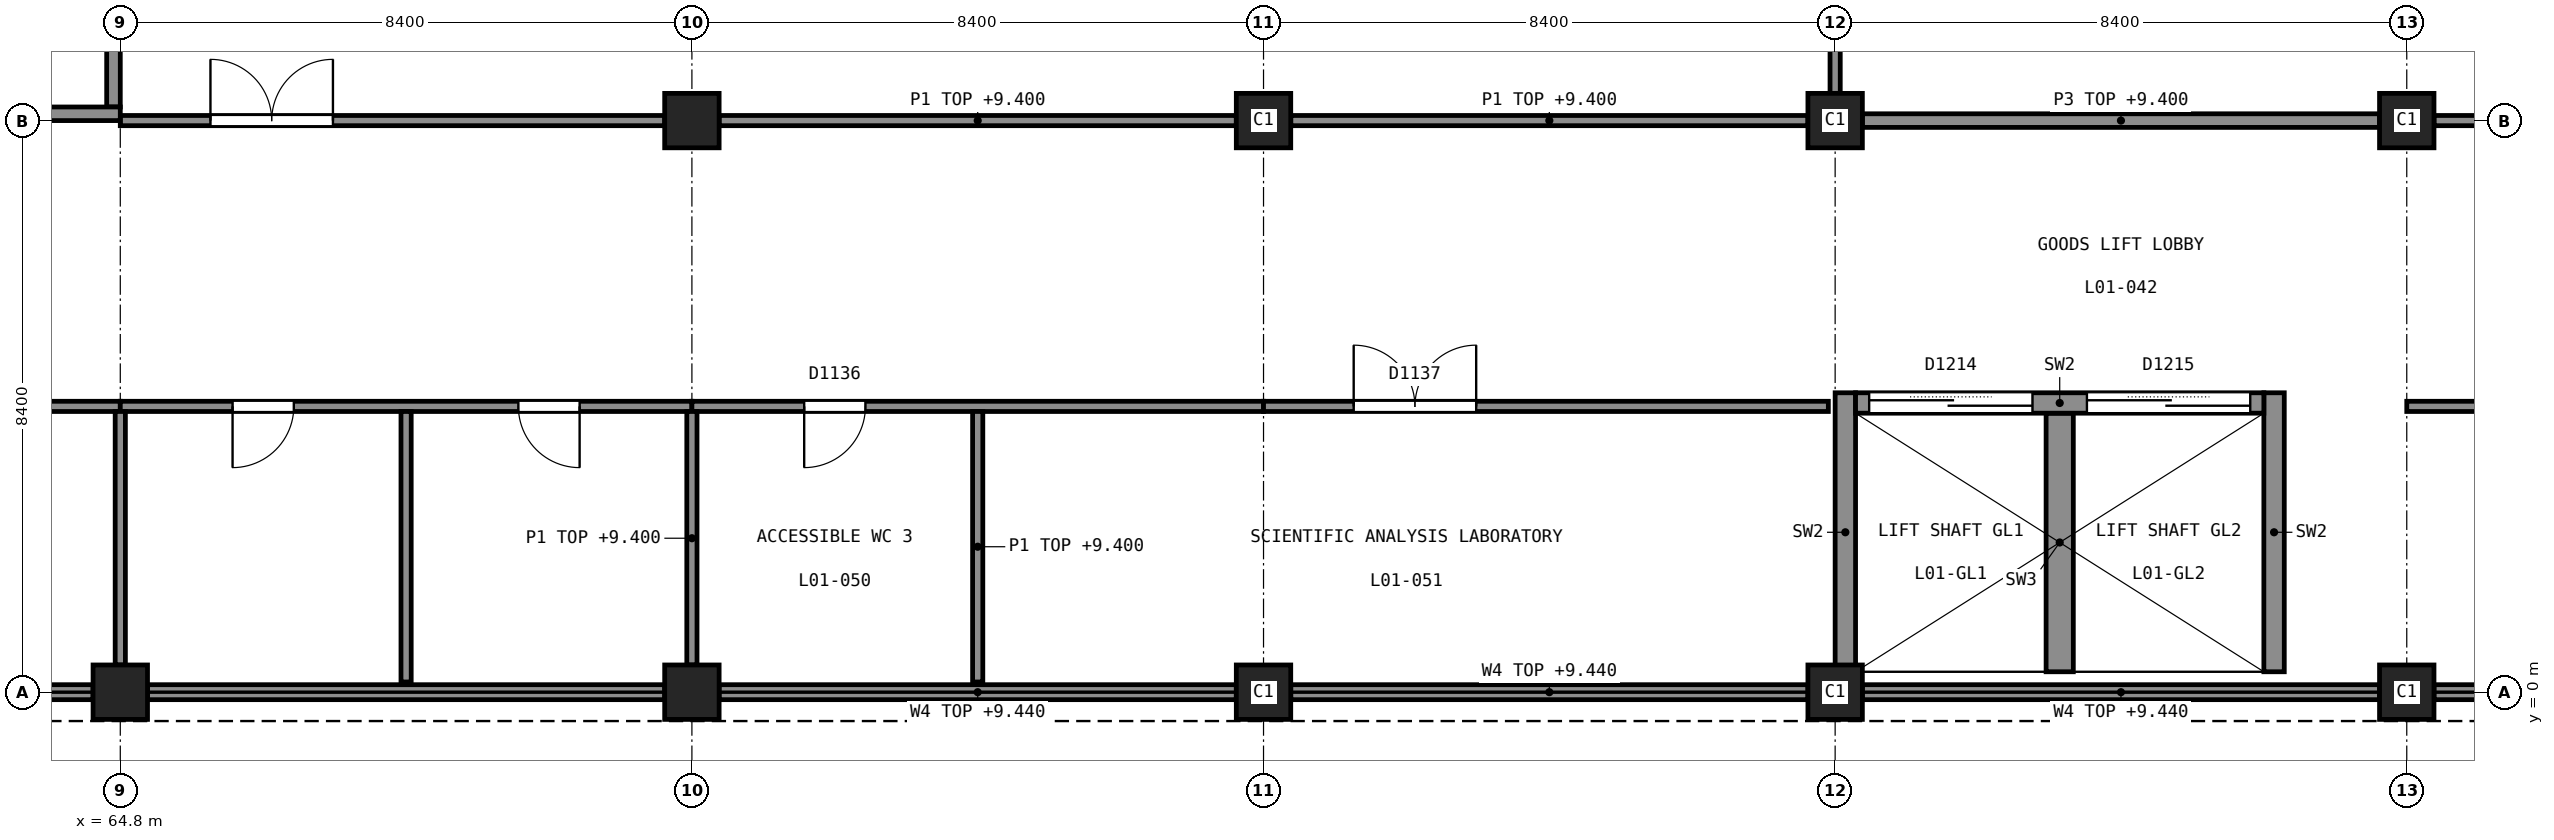
"""IFC4 building model, lengths in metres.
Left out: names, types, materials, properties, quantities, classifications, styles, units other than length and angle.
Written with IfcOpenShell. Run it as: python <this file> out.ifc"""

import sys

from ifc_helpers import new_model, si_unit, direction, frame, frame_2d, origin, origin_2d, place, context, subcontext, project, spatial, rectangle, extrude, element, fill, save


model = new_model("IFC4")
c1 = context("Model", 3, precision=1e-05, world=origin(), true_north=direction((0.0, 1.0)))
c2 = subcontext(c1, "Body", "Model", "MODEL_VIEW")
j1 = project(units=[si_unit("LENGTHUNIT", "METRE"), si_unit("PLANEANGLEUNIT", "RADIAN")], contexts=[c1])
p1 = place(None, origin())
s1 = spatial("IfcSite", under=j1, at=p1, CompositionType="ELEMENT")
p2 = place(p1, origin())
s2 = spatial("IfcBuilding", under=s1, at=p2, CompositionType="ELEMENT")
p3 = place(p2, frame((0.0, 0.0, 5.5)))
s3 = spatial("IfcBuildingStorey", under=s2, at=p3, CompositionType="ELEMENT", Elevation=5.5)
p4 = place(p3, frame((56.4, 8.5, 0.0), z_axis=(0.0, 0.0, 1.0), x_axis=(1.0, 0.0, 0.0)))
e1 = element("IfcWall", 1, at=p4, inside=s3, PredefinedType="SHEAR", context=c2, shape_type="SweptSolid", body=[
    extrude(rectangle(XDim=8.4, YDim=0.2, at=frame_2d((4.2, 0.0))), origin(), (0.0, 0.0, 1.0), 5.0),
])
p5 = place(p4, frame((3.3, 0.0, 0.0)))
e2 = element("IfcOpeningElement", 2, at=p5, cuts=e1, PredefinedType="OPENING", context=c2, shape_type="SweptSolid", body=[
    extrude(rectangle(XDim=1.8, YDim=2.1, at=frame_2d((0.9, 1.05))), frame((0.0, 0.11, 0.0), z_axis=(0.0, -1.0, 0.0), x_axis=(1.0, 0.0, 0.0)), (0.0, 0.0, 1.0), 0.22),
])
p6 = place(p3, frame((64.7, 8.6, 0.0), z_axis=(0.0, 0.0, 1.0), x_axis=(0.0, 1.0, 0.0)))
e3 = element("IfcWall", 3, at=p6, inside=s3, PredefinedType="SHEAR", context=c2, shape_type="SweptSolid", body=[
    extrude(rectangle(XDim=8.0, YDim=0.2, at=frame_2d((4.0, 0.0))), origin(), (0.0, 0.0, 1.0), 5.0),
])
for number, where, z_axis, x_axis in (
    (4, (90.15, 0.3, 0.0), (0.0, 0.0, 1.0), (0.0, 1.0, 0.0)),
    (5, (96.45, 0.3, 0.0), (0.0, 0.0, 1.0), (0.0, 1.0, 0.0)),
):
    element("IfcWall", number, at=place(p3, frame(where, z_axis=z_axis, x_axis=x_axis)), inside=s3, PredefinedType="SHEAR", context=c2, shape_type="SweptSolid", body=[
        extrude(rectangle(XDim=4.1, YDim=0.3, at=frame_2d((2.05, 0.0))), origin(), (0.0, 0.0, 1.0), 5.0),
    ])
p7 = place(p3, frame((90.3, 4.25, 0.0), z_axis=(0.0, 0.0, 1.0), x_axis=(1.0, 0.0, 0.0)))
e6 = element("IfcWall", 6, at=p7, inside=s3, PredefinedType="SHEAR", context=c2, shape_type="SweptSolid", body=[
    extrude(rectangle(XDim=6.0, YDim=0.3, at=frame_2d((3.0, 0.0))), origin(), (0.0, 0.0, 1.0), 5.0),
])
p8 = place(p7, frame((0.2, 0.0, 0.0)))
e7 = element("IfcOpeningElement", 7, at=p8, cuts=e6, PredefinedType="OPENING", context=c2, shape_type="SweptSolid", body=[
    extrude(rectangle(XDim=2.4, YDim=2.4, at=frame_2d((1.2, 1.2))), frame((0.0, 0.16, 0.0), z_axis=(0.0, -1.0, 0.0), x_axis=(1.0, 0.0, 0.0)), (0.0, 0.0, 1.0), 0.32),
])
p9 = place(p7, frame((3.4, 0.0, 0.0)))
e8 = element("IfcOpeningElement", 8, at=p9, cuts=e6, PredefinedType="OPENING", context=c2, shape_type="SweptSolid", body=[
    extrude(rectangle(XDim=2.4, YDim=2.4, at=frame_2d((1.2, 1.2))), frame((0.0, 0.16, 0.0), z_axis=(0.0, -1.0, 0.0), x_axis=(1.0, 0.0, 0.0)), (0.0, 0.0, 1.0), 0.32),
])
p10 = place(p3, frame((93.3, 0.3, 0.0), z_axis=(0.0, 0.0, 1.0), x_axis=(0.0, 1.0, 0.0)))
e9 = element("IfcWall", 9, at=p10, inside=s3, PredefinedType="SHEAR", context=c2, shape_type="SweptSolid", body=[
    extrude(rectangle(XDim=3.8, YDim=0.4, at=frame_2d((1.9, 0.0))), origin(), (0.0, 0.0, 1.0), 5.0),
])
for number, where, z_axis, x_axis in (
    (10, (64.8, 0.0, 0.0), (0.0, 0.0, 1.0), (1.0, 0.0, 0.0)),
    (11, (73.2, 0.0, 0.0), (0.0, 0.0, 1.0), (1.0, 0.0, 0.0)),
    (12, (73.2, 8.4, 0.0), (0.0, 0.0, 1.0), (1.0, 0.0, 0.0)),
    (13, (81.6, 0.0, 0.0), (0.0, 0.0, 1.0), (1.0, 0.0, 0.0)),
    (14, (81.6, 8.4, 0.0), (0.0, 0.0, 1.0), (1.0, 0.0, 0.0)),
    (15, (90.0, 0.0, 0.0), (0.0, 0.0, 1.0), (1.0, 0.0, 0.0)),
    (16, (90.0, 8.4, 0.0), (0.0, 0.0, 1.0), (1.0, 0.0, 0.0)),
    (17, (98.4, 0.0, 0.0), (0.0, 0.0, 1.0), (1.0, 0.0, 0.0)),
    (18, (98.4, 8.4, 0.0), (0.0, 0.0, 1.0), (1.0, 0.0, 0.0)),
):
    element("IfcColumn", number, at=place(p3, frame(where, z_axis=z_axis, x_axis=x_axis)), inside=s3, PredefinedType="COLUMN", context=c2, shape_type="SweptSolid", body=[
        extrude(rectangle(XDim=0.8, YDim=0.8, at=origin_2d()), origin(), (0.0, 0.0, 1.0), 5.0),
    ])
p11 = place(p3, frame((56.8, 0.0, 0.0), z_axis=(0.0, 0.0, 1.0), x_axis=(1.0, 0.0, 0.0)))
e19 = element("IfcWall", 19, at=p11, inside=s3, PredefinedType="SOLIDWALL", context=c2, shape_type="SweptSolid", body=[
    extrude(rectangle(XDim=7.6, YDim=0.22, at=frame_2d((3.8, 0.0))), origin(), (0.0, 0.0, 1.0), 3.94),
])
p12 = place(p3, frame((65.2, 0.0, 0.0), z_axis=(0.0, 0.0, 1.0), x_axis=(1.0, 0.0, 0.0)))
e20 = element("IfcWall", 20, at=p12, inside=s3, PredefinedType="SOLIDWALL", context=c2, shape_type="SweptSolid", body=[
    extrude(rectangle(XDim=7.6, YDim=0.22, at=frame_2d((3.8, 0.0))), origin(), (0.0, 0.0, 1.0), 3.94),
])
p13 = place(p3, frame((73.6, 0.0, 0.0), z_axis=(0.0, 0.0, 1.0), x_axis=(1.0, 0.0, 0.0)))
e21 = element("IfcWall", 21, at=p13, inside=s3, PredefinedType="SOLIDWALL", context=c2, shape_type="SweptSolid", body=[
    extrude(rectangle(XDim=7.6, YDim=0.22, at=frame_2d((3.8, 0.0))), origin(), (0.0, 0.0, 1.0), 3.94),
])
for number, where, z_axis, x_axis in (
    (22, (82.0, 0.0, 0.0), (0.0, 0.0, 1.0), (1.0, 0.0, 0.0)),
    (23, (90.4, 0.0, 0.0), (0.0, 0.0, 1.0), (1.0, 0.0, 0.0)),
):
    element("IfcWall", number, at=place(p3, frame(where, z_axis=z_axis, x_axis=x_axis)), inside=s3, PredefinedType="SOLIDWALL", context=c2, shape_type="SweptSolid", body=[
        extrude(rectangle(XDim=7.6, YDim=0.22, at=frame_2d((3.8, 0.0))), origin(), (0.0, 0.0, 1.0), 3.94),
    ])
p14 = place(p3, frame((98.8, 0.0, 0.0), z_axis=(0.0, 0.0, 1.0), x_axis=(1.0, 0.0, 0.0)))
e24 = element("IfcWall", 24, at=p14, inside=s3, PredefinedType="SOLIDWALL", context=c2, shape_type="SweptSolid", body=[
    extrude(rectangle(XDim=7.6, YDim=0.22, at=frame_2d((3.8, 0.0))), origin(), (0.0, 0.0, 1.0), 3.94),
])
p15 = place(p3, frame((90.0, 8.8, 0.0), z_axis=(0.0, 0.0, 1.0), x_axis=(0.0, 1.0, 0.0)))
e25 = element("IfcWall", 25, at=p15, inside=s3, PredefinedType="PARTITIONING", context=c2, shape_type="SweptSolid", body=[
    extrude(rectangle(XDim=7.6, YDim=0.15, at=frame_2d((3.8, 0.0))), origin(), (0.0, 0.0, 1.0), 3.9),
])
p16 = place(p3, frame((64.8, 8.4, 0.0), z_axis=(0.0, 0.0, 1.0), x_axis=(1.0, 0.0, 0.0)))
e26 = element("IfcWall", 26, at=p16, inside=s3, PredefinedType="PARTITIONING", context=c2, shape_type="SweptSolid", body=[
    extrude(rectangle(XDim=8.0, YDim=0.15, at=frame_2d((4.0, 0.0))), origin(), (0.0, 0.0, 1.0), 3.9),
])
p17 = place(p16, frame((1.325, 0.0, 0.0)))
e27 = element("IfcOpeningElement", 27, at=p17, cuts=e26, PredefinedType="OPENING", context=c2, shape_type="SweptSolid", body=[
    extrude(rectangle(XDim=1.8, YDim=2.1, at=frame_2d((0.9, 1.05))), frame((0.0, 0.085, 0.0), z_axis=(0.0, -1.0, 0.0), x_axis=(1.0, 0.0, 0.0)), (0.0, 0.0, 1.0), 0.17),
])
p18 = place(p3, frame((73.6, 8.4, 0.0), z_axis=(0.0, 0.0, 1.0), x_axis=(1.0, 0.0, 0.0)))
e28 = element("IfcWall", 28, at=p18, inside=s3, PredefinedType="PARTITIONING", context=c2, shape_type="SweptSolid", body=[
    extrude(rectangle(XDim=7.6, YDim=0.15, at=frame_2d((3.8, 0.0))), origin(), (0.0, 0.0, 1.0), 3.9),
])
p19 = place(p3, frame((82.0, 8.4, 0.0), z_axis=(0.0, 0.0, 1.0), x_axis=(1.0, 0.0, 0.0)))
e29 = element("IfcWall", 29, at=p19, inside=s3, PredefinedType="PARTITIONING", context=c2, shape_type="SweptSolid", body=[
    extrude(rectangle(XDim=7.6, YDim=0.15, at=frame_2d((3.8, 0.0))), origin(), (0.0, 0.0, 1.0), 3.9),
])
p20 = place(p3, frame((98.8, 8.4, 0.0), z_axis=(0.0, 0.0, 1.0), x_axis=(1.0, 0.0, 0.0)))
e30 = element("IfcWall", 30, at=p20, inside=s3, PredefinedType="PARTITIONING", context=c2, shape_type="SweptSolid", body=[
    extrude(rectangle(XDim=7.6, YDim=0.15, at=frame_2d((3.8, 0.0))), origin(), (0.0, 0.0, 1.0), 3.9),
])
p21 = place(p3, frame((90.4, 8.4, 0.0), z_axis=(0.0, 0.0, 1.0), x_axis=(1.0, 0.0, 0.0)))
e31 = element("IfcWall", 31, at=p21, inside=s3, PredefinedType="PARTITIONING", context=c2, shape_type="SweptSolid", body=[
    extrude(rectangle(XDim=7.6, YDim=0.2, at=frame_2d((3.8, 0.0))), origin(), (0.0, 0.0, 1.0), 3.9),
])
p22 = place(p3, frame((98.4, 4.2, 0.0), z_axis=(0.0, 0.0, 1.0), x_axis=(1.0, 0.0, 0.0)))
e32 = element("IfcWall", 32, at=p22, inside=s3, PredefinedType="PARTITIONING", context=c2, shape_type="SweptSolid", body=[
    extrude(rectangle(XDim=8.4, YDim=0.15, at=frame_2d((4.2, 0.0))), origin(), (0.0, 0.0, 1.0), 3.9),
])
p23 = place(p22, frame((5.275, 0.0, 0.0)))
e33 = element("IfcOpeningElement", 33, at=p23, cuts=e32, PredefinedType="OPENING", context=c2, shape_type="SweptSolid", body=[
    extrude(rectangle(XDim=1.8, YDim=2.1, at=frame_2d((0.9, 1.05))), frame((0.0, 0.085, 0.0), z_axis=(0.0, -1.0, 0.0), x_axis=(1.0, 0.0, 0.0)), (0.0, 0.0, 1.0), 0.17),
])
p24 = place(p3, frame((56.4, 4.2, 0.0), z_axis=(0.0, 0.0, 1.0), x_axis=(1.0, 0.0, 0.0)))
e34 = element("IfcWall", 34, at=p24, inside=s3, PredefinedType="PARTITIONING", context=c2, shape_type="SweptSolid", body=[
    extrude(rectangle(XDim=8.4, YDim=0.15, at=frame_2d((4.2, 0.0))), origin(), (0.0, 0.0, 1.0), 3.9),
])
p25 = place(p24, frame((1.812, 0.0, 0.0)))
e35 = element("IfcOpeningElement", 35, at=p25, cuts=e34, PredefinedType="OPENING", context=c2, shape_type="SweptSolid", body=[
    extrude(rectangle(XDim=0.9, YDim=2.1, at=frame_2d((0.45, 1.05))), frame((0.0, 0.085, 0.0), z_axis=(0.0, -1.0, 0.0), x_axis=(1.0, 0.0, 0.0)), (0.0, 0.0, 1.0), 0.17),
])
p26 = place(p3, frame((64.8, 4.2, 0.0), z_axis=(0.0, 0.0, 1.0), x_axis=(1.0, 0.0, 0.0)))
e36 = element("IfcWall", 36, at=p26, inside=s3, PredefinedType="PARTITIONING", context=c2, shape_type="SweptSolid", body=[
    extrude(rectangle(XDim=8.4, YDim=0.15, at=frame_2d((4.2, 0.0))), origin(), (0.0, 0.0, 1.0), 3.9),
])
p27 = place(p26, frame((1.65, 0.0, 0.0)))
e37 = element("IfcOpeningElement", 37, at=p27, cuts=e36, PredefinedType="OPENING", context=c2, shape_type="SweptSolid", body=[
    extrude(rectangle(XDim=0.9, YDim=2.1, at=frame_2d((0.45, 1.05))), frame((0.0, 0.085, 0.0), z_axis=(0.0, -1.0, 0.0), x_axis=(1.0, 0.0, 0.0)), (0.0, 0.0, 1.0), 0.17),
])
p28 = place(p26, frame((5.85, 0.0, 0.0)))
e38 = element("IfcOpeningElement", 38, at=p28, cuts=e36, PredefinedType="OPENING", context=c2, shape_type="SweptSolid", body=[
    extrude(rectangle(XDim=0.9, YDim=2.1, at=frame_2d((0.45, 1.05))), frame((0.0, 0.085, 0.0), z_axis=(0.0, -1.0, 0.0), x_axis=(1.0, 0.0, 0.0)), (0.0, 0.0, 1.0), 0.17),
])
p29 = place(p3, frame((73.2, 4.2, 0.0), z_axis=(0.0, 0.0, 1.0), x_axis=(1.0, 0.0, 0.0)))
e39 = element("IfcWall", 39, at=p29, inside=s3, PredefinedType="PARTITIONING", context=c2, shape_type="SweptSolid", body=[
    extrude(rectangle(XDim=8.4, YDim=0.15, at=frame_2d((4.2, 0.0))), origin(), (0.0, 0.0, 1.0), 3.9),
])
p30 = place(p29, frame((1.65, 0.0, 0.0)))
e40 = element("IfcOpeningElement", 40, at=p30, cuts=e39, PredefinedType="OPENING", context=c2, shape_type="SweptSolid", body=[
    extrude(rectangle(XDim=0.9, YDim=2.1, at=frame_2d((0.45, 1.05))), frame((0.0, 0.085, 0.0), z_axis=(0.0, -1.0, 0.0), x_axis=(1.0, 0.0, 0.0)), (0.0, 0.0, 1.0), 0.17),
])
p31 = place(p3, frame((81.6, 4.2, 0.0), z_axis=(0.0, 0.0, 1.0), x_axis=(1.0, 0.0, 0.0)))
e41 = element("IfcWall", 41, at=p31, inside=s3, PredefinedType="PARTITIONING", context=c2, shape_type="SweptSolid", body=[
    extrude(rectangle(XDim=8.3, YDim=0.15, at=frame_2d((4.15, 0.0))), origin(), (0.0, 0.0, 1.0), 3.9),
])
p32 = place(p31, frame((1.325, 0.0, 0.0)))
e42 = element("IfcOpeningElement", 42, at=p32, cuts=e41, PredefinedType="OPENING", context=c2, shape_type="SweptSolid", body=[
    extrude(rectangle(XDim=1.8, YDim=2.1, at=frame_2d((0.9, 1.05))), frame((0.0, 0.085, 0.0), z_axis=(0.0, -1.0, 0.0), x_axis=(1.0, 0.0, 0.0)), (0.0, 0.0, 1.0), 0.17),
])
p33 = place(p3, frame((64.8, 0.4, 0.0), z_axis=(0.0, 0.0, 1.0), x_axis=(0.0, 1.0, 0.0)))
e43 = element("IfcWall", 43, at=p33, inside=s3, PredefinedType="PARTITIONING", context=c2, shape_type="SweptSolid", body=[
    extrude(rectangle(XDim=3.725, YDim=0.15, at=frame_2d((1.863, 0.0))), origin(), (0.0, 0.0, 1.0), 3.9),
])
p34 = place(p3, frame((69.0, 0.15, 0.0), z_axis=(0.0, 0.0, 1.0), x_axis=(0.0, 1.0, 0.0)))
e44 = element("IfcWall", 44, at=p34, inside=s3, PredefinedType="PARTITIONING", context=c2, shape_type="SweptSolid", body=[
    extrude(rectangle(XDim=3.975, YDim=0.15, at=frame_2d((1.988, 0.0))), origin(), (0.0, 0.0, 1.0), 3.9),
])
p35 = place(p3, frame((73.2, 0.4, 0.0), z_axis=(0.0, 0.0, 1.0), x_axis=(0.0, 1.0, 0.0)))
e45 = element("IfcWall", 45, at=p35, inside=s3, PredefinedType="PARTITIONING", context=c2, shape_type="SweptSolid", body=[
    extrude(rectangle(XDim=3.725, YDim=0.15, at=frame_2d((1.863, 0.0))), origin(), (0.0, 0.0, 1.0), 3.9),
])
p36 = place(p3, frame((77.4, 0.15, 0.0), z_axis=(0.0, 0.0, 1.0), x_axis=(0.0, 1.0, 0.0)))
e46 = element("IfcWall", 46, at=p36, inside=s3, PredefinedType="PARTITIONING", context=c2, shape_type="SweptSolid", body=[
    extrude(rectangle(XDim=3.975, YDim=0.15, at=frame_2d((1.988, 0.0))), origin(), (0.0, 0.0, 1.0), 3.9),
])
p37 = place(p17, origin())
e47 = element("IfcDoor", 47, at=p37, inside=s3, OperationType="DOUBLE_DOOR_SINGLE_SWING", PredefinedType="DOOR", context=c2, shape_type="SweptSolid", body=[
    extrude(rectangle(XDim=1.8, YDim=2.1, at=frame_2d((0.9, 1.05))), frame((0.0, 0.025, 0.0), z_axis=(0.0, -1.0, 0.0), x_axis=(1.0, 0.0, 0.0)), (0.0, 0.0, 1.0), 0.05),
])
fill(e27, e47)
p38 = place(p27, origin())
e48 = element("IfcDoor", 48, at=p38, inside=s3, OperationType="SINGLE_SWING_LEFT", PredefinedType="DOOR", context=c2, shape_type="SweptSolid", body=[
    extrude(rectangle(XDim=0.9, YDim=2.1, at=frame_2d((0.45, 1.05))), frame((0.0, 0.025, 0.0), z_axis=(0.0, -1.0, 0.0), x_axis=(1.0, 0.0, 0.0)), (0.0, 0.0, 1.0), 0.05),
])
fill(e37, e48)
p39 = place(p28, origin())
e49 = element("IfcDoor", 49, at=p39, inside=s3, OperationType="SINGLE_SWING_RIGHT", PredefinedType="DOOR", context=c2, shape_type="SweptSolid", body=[
    extrude(rectangle(XDim=0.9, YDim=2.1, at=frame_2d((0.45, 1.05))), frame((0.0, 0.025, 0.0), z_axis=(0.0, -1.0, 0.0), x_axis=(1.0, 0.0, 0.0)), (0.0, 0.0, 1.0), 0.05),
])
fill(e38, e49)
p40 = place(p30, origin())
e50 = element("IfcDoor", 50, at=p40, inside=s3, OperationType="SINGLE_SWING_LEFT", PredefinedType="DOOR", context=c2, shape_type="SweptSolid", body=[
    extrude(rectangle(XDim=0.9, YDim=2.1, at=frame_2d((0.45, 1.05))), frame((0.0, 0.025, 0.0), z_axis=(0.0, -1.0, 0.0), x_axis=(1.0, 0.0, 0.0)), (0.0, 0.0, 1.0), 0.05),
])
fill(e40, e50)
p41 = place(p32, origin())
e51 = element("IfcDoor", 51, at=p41, inside=s3, OperationType="DOUBLE_DOOR_SINGLE_SWING", PredefinedType="DOOR", context=c2, shape_type="SweptSolid", body=[
    extrude(rectangle(XDim=1.8, YDim=2.1, at=frame_2d((0.9, 1.05))), frame((0.0, 0.025, 0.0), z_axis=(0.0, -1.0, 0.0), x_axis=(1.0, 0.0, 0.0)), (0.0, 0.0, 1.0), 0.05),
])
fill(e42, e51)
p42 = place(p8, origin())
e52 = element("IfcDoor", 52, at=p42, inside=s3, OperationType="DOUBLE_DOOR_SLIDING", PredefinedType="DOOR", context=c2, shape_type="SweptSolid", body=[
    extrude(rectangle(XDim=2.4, YDim=2.4, at=frame_2d((1.2, 1.2))), frame((0.0, 0.025, 0.0), z_axis=(0.0, -1.0, 0.0), x_axis=(1.0, 0.0, 0.0)), (0.0, 0.0, 1.0), 0.05),
])
fill(e7, e52)
p43 = place(p9, origin())
e53 = element("IfcDoor", 53, at=p43, inside=s3, OperationType="DOUBLE_DOOR_SLIDING", PredefinedType="DOOR", context=c2, shape_type="SweptSolid", body=[
    extrude(rectangle(XDim=2.4, YDim=2.4, at=frame_2d((1.2, 1.2))), frame((0.0, 0.025, 0.0), z_axis=(0.0, -1.0, 0.0), x_axis=(1.0, 0.0, 0.0)), (0.0, 0.0, 1.0), 0.05),
])
fill(e8, e53)
save(model, sys.argv[1])
